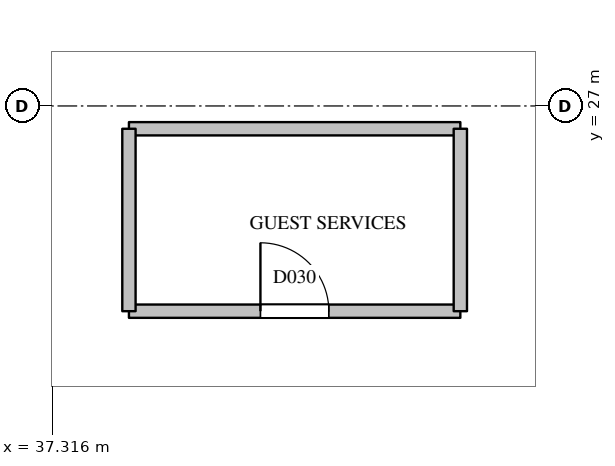
"""IFC4 building model, lengths in metres.
Left out: names, types, materials, properties, quantities, classifications, styles, units other than length and angle.
Written with IfcOpenShell. Run it as: python <this file> out.ifc"""

import sys

from ifc_helpers import new_model, si_unit, direction, frame, frame_2d, origin, place, context, subcontext, project, spatial, rectangle, extrude, element, fill, save


model = new_model("IFC4")
c1 = context("Model", 3, precision=1e-05, world=origin(), true_north=direction((0.0, 1.0)))
c2 = subcontext(c1, "Body", "Model", "MODEL_VIEW")
j1 = project(units=[si_unit("LENGTHUNIT", "METRE"), si_unit("PLANEANGLEUNIT", "RADIAN")], contexts=[c1])
p1 = place(None, origin())
s1 = spatial("IfcSite", under=j1, at=p1, CompositionType="ELEMENT")
p2 = place(p1, origin())
s2 = spatial("IfcBuilding", under=s1, at=p2, CompositionType="ELEMENT")
p3 = place(p2, frame((0.0, 0.0, 57.6)))
s3 = spatial("IfcBuildingStorey", under=s2, at=p3, CompositionType="ELEMENT", Elevation=57.6)
p4 = place(p3, frame((38.32, 24.3, 0.0), z_axis=(0.0, 0.0, 1.0), x_axis=(1.0, 0.0, 0.0)))
e1 = element("IfcWall", 1, at=p4, inside=s3, PredefinedType="PARTITIONING", context=c2, shape_type="SweptSolid", body=[
    extrude(rectangle(XDim=4.36, YDim=0.175, at=frame_2d((2.18, 0.0))), origin(), (0.0, 0.0, 1.0), 3.5),
])
p5 = place(p4, frame((1.73, 0.0, 0.0)))
e2 = element("IfcOpeningElement", 2, at=p5, cuts=e1, PredefinedType="OPENING", context=c2, shape_type="SweptSolid", body=[
    extrude(rectangle(XDim=0.9, YDim=2.1, at=frame_2d((0.45, 1.05))), frame((0.0, 0.097, 0.0), z_axis=(0.0, -1.0, 0.0), x_axis=(1.0, 0.0, 0.0)), (0.0, 0.0, 1.0), 0.195),
])
p6 = place(p3, frame((38.32, 26.7, 0.0), z_axis=(0.0, 0.0, 1.0), x_axis=(1.0, 0.0, 0.0)))
e3 = element("IfcWall", 3, at=p6, inside=s3, PredefinedType="PARTITIONING", context=c2, shape_type="SweptSolid", body=[
    extrude(rectangle(XDim=4.36, YDim=0.175, at=frame_2d((2.18, 0.0))), origin(), (0.0, 0.0, 1.0), 2.5),
])
for number, where, z_axis, x_axis in (
    (4, (38.32, 24.3, 0.0), (0.0, 0.0, 1.0), (0.0, 1.0, 0.0)),
    (5, (42.68, 24.3, 0.0), (0.0, 0.0, 1.0), (0.0, 1.0, 0.0)),
):
    element("IfcWall", number, at=place(p3, frame(where, z_axis=z_axis, x_axis=x_axis)), inside=s3, PredefinedType="PARTITIONING", context=c2, shape_type="SweptSolid", body=[
        extrude(rectangle(XDim=2.4, YDim=0.175, at=frame_2d((1.2, 0.0))), origin(), (0.0, 0.0, 1.0), 2.5),
    ])
p7 = place(p5, origin())
e6 = element("IfcDoor", 6, at=p7, inside=s3, OperationType="SINGLE_SWING_LEFT", PredefinedType="DOOR", context=c2, shape_type="SweptSolid", body=[
    extrude(rectangle(XDim=0.9, YDim=2.1, at=frame_2d((0.45, 1.05))), frame((0.0, 0.025, 0.0), z_axis=(0.0, -1.0, 0.0), x_axis=(1.0, 0.0, 0.0)), (0.0, 0.0, 1.0), 0.05),
])
fill(e2, e6)
save(model, sys.argv[1])
